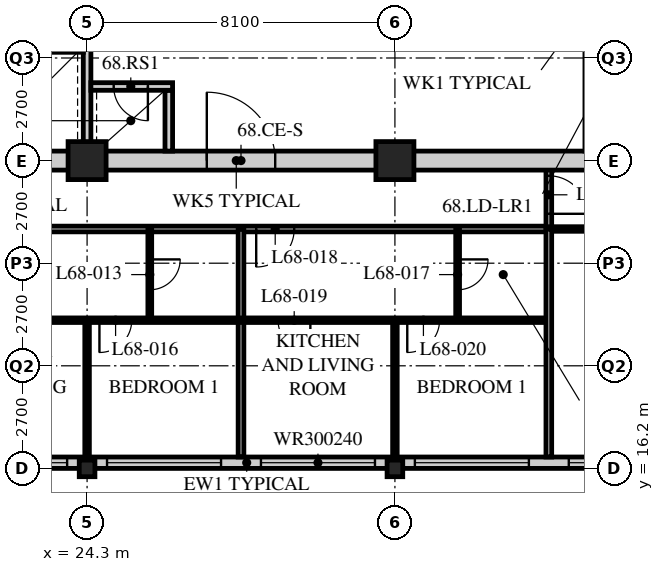
"""IFC4 building model, lengths in metres.
Left out: names, types, materials, properties, quantities, classifications, styles, units other than length and angle.
Written with IfcOpenShell. Run it as: python <this file> out.ifc"""

import sys

from ifc_helpers import new_model, si_unit, direction, frame, frame_2d, origin, origin_2d, place, context, subcontext, project, spatial, rectangle, hollow_rectangle, i_section, extrude, element, fill, save


model = new_model("IFC4")
c1 = context("Model", 3, precision=1e-05, world=origin(), true_north=direction((0.0, 1.0)))
c2 = subcontext(c1, "Body", "Model", "MODEL_VIEW")
j1 = project(units=[si_unit("LENGTHUNIT", "METRE"), si_unit("PLANEANGLEUNIT", "RADIAN")], contexts=[c1])
p1 = place(None, origin())
s1 = spatial("IfcSite", under=j1, at=p1, CompositionType="ELEMENT")
p2 = place(p1, origin())
s2 = spatial("IfcBuilding", under=s1, at=p2, CompositionType="ELEMENT")
p3 = place(p2, frame((0.0, 0.0, 265.8)))
s3 = spatial("IfcBuildingStorey", under=s2, at=p3, CompositionType="ELEMENT", Elevation=265.8)
p4 = place(p3, frame((24.3, 16.2, 0.0), z_axis=(0.0, 0.0, 1.0), x_axis=(1.0, 0.0, 0.0)))
e1 = element("IfcColumn", 1, at=p4, inside=s3, PredefinedType="COLUMN", context=c2, shape_type="SweptSolid", body=[
    extrude(i_section(OverallWidth=0.412, OverallDepth=0.437, WebThickness=0.036, FlangeThickness=0.058, FilletRadius=0.015, at=origin_2d()), origin(), (0.0, 0.0, 1.0), 3.9),
])
p5 = place(p3, frame((24.3, 24.3, 0.0), z_axis=(0.0, 0.0, 1.0), x_axis=(1.0, 0.0, 0.0)))
e2 = element("IfcColumn", 2, at=p5, inside=s3, PredefinedType="COLUMN", context=c2, shape_type="SweptSolid", body=[
    extrude(hollow_rectangle(XDim=1.0, YDim=1.0, WallThickness=0.1, at=origin_2d()), origin(), (0.0, 0.0, 1.0), 3.9),
])
p6 = place(p3, frame((32.4, 16.2, 0.0), z_axis=(0.0, 0.0, 1.0), x_axis=(1.0, 0.0, 0.0)))
e3 = element("IfcColumn", 3, at=p6, inside=s3, PredefinedType="COLUMN", context=c2, shape_type="SweptSolid", body=[
    extrude(i_section(OverallWidth=0.412, OverallDepth=0.437, WebThickness=0.036, FlangeThickness=0.058, FilletRadius=0.015, at=origin_2d()), origin(), (0.0, 0.0, 1.0), 3.9),
])
p7 = place(p3, frame((32.4, 24.3, 0.0), z_axis=(0.0, 0.0, 1.0), x_axis=(1.0, 0.0, 0.0)))
e4 = element("IfcColumn", 4, at=p7, inside=s3, PredefinedType="COLUMN", context=c2, shape_type="SweptSolid", body=[
    extrude(hollow_rectangle(XDim=1.0, YDim=1.0, WallThickness=0.1, at=origin_2d()), origin(), (0.0, 0.0, 1.0), 3.9),
])
p8 = place(p3, frame((8.4, 16.35, 0.0), z_axis=(0.0, 0.0, 1.0), x_axis=(1.0, 0.0, 0.0)))
e5 = element("IfcWall", 5, at=p8, inside=s3, PredefinedType="SOLIDWALL", context=c2, shape_type="SweptSolid", body=[
    extrude(rectangle(XDim=40.2, YDim=0.3, at=frame_2d((20.1, 0.0))), origin(), (0.0, 0.0, 1.0), 3.69),
])
p9 = place(p8, frame((0.225, 0.0, 0.6)))
e6 = element("IfcOpeningElement", 6, at=p9, cuts=e5, PredefinedType="OPENING", context=c2, shape_type="SweptSolid", body=[
    extrude(rectangle(XDim=3.0, YDim=2.4, at=frame_2d((1.5, 1.2))), frame((0.0, 0.16, 0.0), z_axis=(0.0, -1.0, 0.0), x_axis=(1.0, 0.0, 0.0)), (0.0, 0.0, 1.0), 0.32),
])
p10 = place(p8, frame((4.275, 0.0, 0.6)))
e7 = element("IfcOpeningElement", 7, at=p10, cuts=e5, PredefinedType="OPENING", context=c2, shape_type="SweptSolid", body=[
    extrude(rectangle(XDim=3.0, YDim=2.4, at=frame_2d((1.5, 1.2))), frame((0.0, 0.16, 0.0), z_axis=(0.0, -1.0, 0.0), x_axis=(1.0, 0.0, 0.0)), (0.0, 0.0, 1.0), 0.32),
])
p11 = place(p8, frame((8.325, 0.0, 0.6)))
e8 = element("IfcOpeningElement", 8, at=p11, cuts=e5, PredefinedType="OPENING", context=c2, shape_type="SweptSolid", body=[
    extrude(rectangle(XDim=3.0, YDim=2.4, at=frame_2d((1.5, 1.2))), frame((0.0, 0.16, 0.0), z_axis=(0.0, -1.0, 0.0), x_axis=(1.0, 0.0, 0.0)), (0.0, 0.0, 1.0), 0.32),
])
p12 = place(p8, frame((12.375, 0.0, 0.6)))
e9 = element("IfcOpeningElement", 9, at=p12, cuts=e5, PredefinedType="OPENING", context=c2, shape_type="SweptSolid", body=[
    extrude(rectangle(XDim=3.0, YDim=2.4, at=frame_2d((1.5, 1.2))), frame((0.0, 0.16, 0.0), z_axis=(0.0, -1.0, 0.0), x_axis=(1.0, 0.0, 0.0)), (0.0, 0.0, 1.0), 0.32),
])
p13 = place(p8, frame((16.425, 0.0, 0.6)))
e10 = element("IfcOpeningElement", 10, at=p13, cuts=e5, PredefinedType="OPENING", context=c2, shape_type="SweptSolid", body=[
    extrude(rectangle(XDim=3.0, YDim=2.4, at=frame_2d((1.5, 1.2))), frame((0.0, 0.16, 0.0), z_axis=(0.0, -1.0, 0.0), x_axis=(1.0, 0.0, 0.0)), (0.0, 0.0, 1.0), 0.32),
])
p14 = place(p8, frame((20.475, 0.0, 0.6)))
e11 = element("IfcOpeningElement", 11, at=p14, cuts=e5, PredefinedType="OPENING", context=c2, shape_type="SweptSolid", body=[
    extrude(rectangle(XDim=3.0, YDim=2.4, at=frame_2d((1.5, 1.2))), frame((0.0, 0.16, 0.0), z_axis=(0.0, -1.0, 0.0), x_axis=(1.0, 0.0, 0.0)), (0.0, 0.0, 1.0), 0.32),
])
p15 = place(p8, frame((24.525, 0.0, 0.6)))
e12 = element("IfcOpeningElement", 12, at=p15, cuts=e5, PredefinedType="OPENING", context=c2, shape_type="SweptSolid", body=[
    extrude(rectangle(XDim=3.0, YDim=2.4, at=frame_2d((1.5, 1.2))), frame((0.0, 0.16, 0.0), z_axis=(0.0, -1.0, 0.0), x_axis=(1.0, 0.0, 0.0)), (0.0, 0.0, 1.0), 0.32),
])
p16 = place(p8, frame((28.575, 0.0, 0.6)))
e13 = element("IfcOpeningElement", 13, at=p16, cuts=e5, PredefinedType="OPENING", context=c2, shape_type="SweptSolid", body=[
    extrude(rectangle(XDim=3.0, YDim=2.4, at=frame_2d((1.5, 1.2))), frame((0.0, 0.16, 0.0), z_axis=(0.0, -1.0, 0.0), x_axis=(1.0, 0.0, 0.0)), (0.0, 0.0, 1.0), 0.32),
])
p17 = place(p8, frame((32.625, 0.0, 0.6)))
e14 = element("IfcOpeningElement", 14, at=p17, cuts=e5, PredefinedType="OPENING", context=c2, shape_type="SweptSolid", body=[
    extrude(rectangle(XDim=3.0, YDim=2.4, at=frame_2d((1.5, 1.2))), frame((0.0, 0.16, 0.0), z_axis=(0.0, -1.0, 0.0), x_axis=(1.0, 0.0, 0.0)), (0.0, 0.0, 1.0), 0.32),
])
p18 = place(p8, frame((36.675, 0.0, 0.6)))
e15 = element("IfcOpeningElement", 15, at=p18, cuts=e5, PredefinedType="OPENING", context=c2, shape_type="SweptSolid", body=[
    extrude(rectangle(XDim=3.0, YDim=2.4, at=frame_2d((1.5, 1.2))), frame((0.0, 0.16, 0.0), z_axis=(0.0, -1.0, 0.0), x_axis=(1.0, 0.0, 0.0)), (0.0, 0.0, 1.0), 0.32),
])
p19 = place(p3, frame((8.1, 22.5, 0.0), z_axis=(0.0, 0.0, 1.0), x_axis=(1.0, 0.0, 0.0)))
e16 = element("IfcWall", 16, at=p19, inside=s3, PredefinedType="PARTITIONING", context=c2, shape_type="SweptSolid", body=[
    extrude(rectangle(XDim=28.35, YDim=0.15, at=frame_2d((14.175, 0.0))), origin(), (0.0, 0.0, 1.0), 3.69),
])
p20 = place(p19, frame((4.45, 0.0, 0.0)))
e17 = element("IfcOpeningElement", 17, at=p20, cuts=e16, PredefinedType="OPENING", context=c2, shape_type="SweptSolid", body=[
    extrude(rectangle(XDim=1.0, YDim=2.1, at=frame_2d((0.5, 1.05))), frame((0.0, 0.085, 0.0), z_axis=(0.0, -1.0, 0.0), x_axis=(1.0, 0.0, 0.0)), (0.0, 0.0, 1.0), 0.17),
])
p21 = place(p19, frame((12.55, 0.0, 0.0)))
e18 = element("IfcOpeningElement", 18, at=p21, cuts=e16, PredefinedType="OPENING", context=c2, shape_type="SweptSolid", body=[
    extrude(rectangle(XDim=1.0, YDim=2.1, at=frame_2d((0.5, 1.05))), frame((0.0, 0.085, 0.0), z_axis=(0.0, -1.0, 0.0), x_axis=(1.0, 0.0, 0.0)), (0.0, 0.0, 1.0), 0.17),
])
p22 = place(p19, frame((20.65, 0.0, 0.0)))
e19 = element("IfcOpeningElement", 19, at=p22, cuts=e16, PredefinedType="OPENING", context=c2, shape_type="SweptSolid", body=[
    extrude(rectangle(XDim=1.0, YDim=2.1, at=frame_2d((0.5, 1.05))), frame((0.0, 0.085, 0.0), z_axis=(0.0, -1.0, 0.0), x_axis=(1.0, 0.0, 0.0)), (0.0, 0.0, 1.0), 0.17),
])
p23 = place(p19, frame((2.625, 0.0, 0.0)))
e20 = element("IfcOpeningElement", 20, at=p23, cuts=e16, PredefinedType="OPENING", context=c2, shape_type="SweptSolid", body=[
    extrude(rectangle(XDim=1.0, YDim=2.1, at=frame_2d((0.5, 1.05))), frame((0.0, 0.085, 0.0), z_axis=(0.0, -1.0, 0.0), x_axis=(1.0, 0.0, 0.0)), (0.0, 0.0, 1.0), 0.17),
])
p24 = place(p3, frame((36.45, 22.5, 0.0), z_axis=(0.0, 0.0, 1.0), x_axis=(0.0, 1.0, 0.0)))
e21 = element("IfcWall", 21, at=p24, inside=s3, PredefinedType="PARTITIONING", context=c2, shape_type="SweptSolid", body=[
    extrude(rectangle(XDim=1.8, YDim=0.15, at=frame_2d((0.9, 0.0))), origin(), (0.0, 0.0, 1.0), 3.69),
])
p25 = place(p24, frame((0.4, 0.0, 0.0)))
e22 = element("IfcOpeningElement", 22, at=p25, cuts=e21, PredefinedType="OPENING", context=c2, shape_type="SweptSolid", body=[
    extrude(rectangle(XDim=1.0, YDim=2.1, at=frame_2d((0.5, 1.05))), frame((0.0, 0.085, 0.0), z_axis=(0.0, -1.0, 0.0), x_axis=(1.0, 0.0, 0.0)), (0.0, 0.0, 1.0), 0.17),
])
p26 = place(p3, frame((25.95, 22.5, 0.0), z_axis=(0.0, 0.0, 1.0), x_axis=(0.0, -1.0, 0.0)))
e23 = element("IfcWall", 23, at=p26, inside=s3, PredefinedType="PARTITIONING", context=c2, shape_type="SweptSolid", body=[
    extrude(rectangle(XDim=2.4, YDim=0.1, at=frame_2d((1.2, 0.0))), origin(), (0.0, 0.0, 1.0), 3.69),
])
p27 = place(p26, frame((0.8, 0.0, 0.0)))
e24 = element("IfcOpeningElement", 24, at=p27, cuts=e23, PredefinedType="OPENING", context=c2, shape_type="SweptSolid", body=[
    extrude(rectangle(XDim=0.8, YDim=2.1, at=frame_2d((0.4, 1.05))), frame((0.0, 0.06, 0.0), z_axis=(0.0, -1.0, 0.0), x_axis=(1.0, 0.0, 0.0)), (0.0, 0.0, 1.0), 0.12),
])
p28 = place(p3, frame((24.3, 20.1, 0.0), z_axis=(0.0, 0.0, 1.0), x_axis=(0.0, -1.0, 0.0)))
e25 = element("IfcWall", 25, at=p28, inside=s3, PredefinedType="PARTITIONING", context=c2, shape_type="SweptSolid", body=[
    extrude(rectangle(XDim=3.6, YDim=0.12, at=frame_2d((1.8, 0.0))), origin(), (0.0, 0.0, 1.0), 3.078),
])
p29 = place(p3, frame((28.35, 22.5, 0.0), z_axis=(0.0, 0.0, 1.0), x_axis=(0.0, -1.0, 0.0)))
e26 = element("IfcWall", 26, at=p29, inside=s3, PredefinedType="PARTITIONING", context=c2, shape_type="SweptSolid", body=[
    extrude(rectangle(XDim=6.0, YDim=0.15, at=frame_2d((3.0, 0.0))), origin(), (0.0, 0.0, 1.0), 3.69),
])
p30 = place(p3, frame((34.05, 22.5, 0.0), z_axis=(0.0, 0.0, 1.0), x_axis=(0.0, -1.0, 0.0)))
e27 = element("IfcWall", 27, at=p30, inside=s3, PredefinedType="PARTITIONING", context=c2, shape_type="SweptSolid", body=[
    extrude(rectangle(XDim=2.4, YDim=0.1, at=frame_2d((1.2, 0.0))), origin(), (0.0, 0.0, 1.0), 3.69),
])
p31 = place(p30, frame((0.8, 0.0, 0.0)))
e28 = element("IfcOpeningElement", 28, at=p31, cuts=e27, PredefinedType="OPENING", context=c2, shape_type="SweptSolid", body=[
    extrude(rectangle(XDim=0.8, YDim=2.1, at=frame_2d((0.4, 1.05))), frame((0.0, 0.06, 0.0), z_axis=(0.0, -1.0, 0.0), x_axis=(1.0, 0.0, 0.0)), (0.0, 0.0, 1.0), 0.12),
])
p32 = place(p3, frame((32.4, 20.1, 0.0), z_axis=(0.0, 0.0, 1.0), x_axis=(0.0, -1.0, 0.0)))
e29 = element("IfcWall", 29, at=p32, inside=s3, PredefinedType="PARTITIONING", context=c2, shape_type="SweptSolid", body=[
    extrude(rectangle(XDim=3.6, YDim=0.12, at=frame_2d((1.8, 0.0))), origin(), (0.0, 0.0, 1.0), 3.078),
])
p33 = place(p3, frame((8.1, 20.1, 0.0), z_axis=(0.0, 0.0, 1.0), x_axis=(1.0, 0.0, 0.0)))
e30 = element("IfcWall", 30, at=p33, inside=s3, PredefinedType="PARTITIONING", context=c2, shape_type="SweptSolid", body=[
    extrude(rectangle(XDim=28.35, YDim=0.12, at=frame_2d((14.175, 0.0))), origin(), (0.0, 0.0, 1.0), 3.69),
])
p34 = place(p33, frame((5.025, 0.0, 0.0)))
e31 = element("IfcOpeningElement", 31, at=p34, cuts=e30, PredefinedType="OPENING", context=c2, shape_type="SweptSolid", body=[
    extrude(rectangle(XDim=0.85, YDim=2.1, at=frame_2d((0.425, 1.05))), frame((0.0, 0.07, 0.0), z_axis=(0.0, -1.0, 0.0), x_axis=(1.0, 0.0, 0.0)), (0.0, 0.0, 1.0), 0.14),
])
p35 = place(p33, frame((8.425, 0.0, 0.0)))
e32 = element("IfcOpeningElement", 32, at=p35, cuts=e30, PredefinedType="OPENING", context=c2, shape_type="SweptSolid", body=[
    extrude(rectangle(XDim=0.85, YDim=2.1, at=frame_2d((0.425, 1.05))), frame((0.0, 0.07, 0.0), z_axis=(0.0, -1.0, 0.0), x_axis=(1.0, 0.0, 0.0)), (0.0, 0.0, 1.0), 0.14),
])
p36 = place(p33, frame((13.125, 0.0, 0.0)))
e33 = element("IfcOpeningElement", 33, at=p36, cuts=e30, PredefinedType="OPENING", context=c2, shape_type="SweptSolid", body=[
    extrude(rectangle(XDim=0.85, YDim=2.1, at=frame_2d((0.425, 1.05))), frame((0.0, 0.07, 0.0), z_axis=(0.0, -1.0, 0.0), x_axis=(1.0, 0.0, 0.0)), (0.0, 0.0, 1.0), 0.14),
])
p37 = place(p33, frame((16.525, 0.0, 0.0)))
e34 = element("IfcOpeningElement", 34, at=p37, cuts=e30, PredefinedType="OPENING", context=c2, shape_type="SweptSolid", body=[
    extrude(rectangle(XDim=0.85, YDim=2.1, at=frame_2d((0.425, 1.05))), frame((0.0, 0.07, 0.0), z_axis=(0.0, -1.0, 0.0), x_axis=(1.0, 0.0, 0.0)), (0.0, 0.0, 1.0), 0.14),
])
p38 = place(p33, frame((21.225, 0.0, 0.0)))
e35 = element("IfcOpeningElement", 35, at=p38, cuts=e30, PredefinedType="OPENING", context=c2, shape_type="SweptSolid", body=[
    extrude(rectangle(XDim=0.85, YDim=2.1, at=frame_2d((0.425, 1.05))), frame((0.0, 0.07, 0.0), z_axis=(0.0, -1.0, 0.0), x_axis=(1.0, 0.0, 0.0)), (0.0, 0.0, 1.0), 0.14),
])
p39 = place(p33, frame((24.625, 0.0, 0.0)))
e36 = element("IfcOpeningElement", 36, at=p39, cuts=e30, PredefinedType="OPENING", context=c2, shape_type="SweptSolid", body=[
    extrude(rectangle(XDim=0.85, YDim=2.1, at=frame_2d((0.425, 1.05))), frame((0.0, 0.07, 0.0), z_axis=(0.0, -1.0, 0.0), x_axis=(1.0, 0.0, 0.0)), (0.0, 0.0, 1.0), 0.14),
])
p40 = place(p33, frame((2.725, 0.0, 0.0)))
e37 = element("IfcOpeningElement", 37, at=p40, cuts=e30, PredefinedType="OPENING", context=c2, shape_type="SweptSolid", body=[
    extrude(rectangle(XDim=0.85, YDim=2.1, at=frame_2d((0.425, 1.05))), frame((0.0, 0.07, 0.0), z_axis=(0.0, -1.0, 0.0), x_axis=(1.0, 0.0, 0.0)), (0.0, 0.0, 1.0), 0.14),
])
p41 = place(p3, frame((36.45, 22.5, 0.0), z_axis=(0.0, 0.0, 1.0), x_axis=(1.0, 0.0, 0.0)))
e38 = element("IfcWall", 38, at=p41, inside=s3, PredefinedType="PARTITIONING", context=c2, shape_type="SweptSolid", body=[
    extrude(rectangle(XDim=6.45, YDim=0.12, at=frame_2d((3.225, 0.0))), origin(), (0.0, 0.0, 1.0), 3.69),
])
p42 = place(p41, frame((2.8, 0.0, 0.0)))
e39 = element("IfcOpeningElement", 39, at=p42, cuts=e38, PredefinedType="OPENING", context=c2, shape_type="SweptSolid", body=[
    extrude(rectangle(XDim=0.85, YDim=2.1, at=frame_2d((0.425, 1.05))), frame((0.0, 0.07, 0.0), z_axis=(0.0, -1.0, 0.0), x_axis=(1.0, 0.0, 0.0)), (0.0, 0.0, 1.0), 0.14),
])
p43 = place(p3, frame((36.45, 16.5, 0.0), z_axis=(0.0, 0.0, 1.0), x_axis=(0.0, 1.0, 0.0)))
e40 = element("IfcWall", 40, at=p43, inside=s3, PredefinedType="PARTITIONING", context=c2, shape_type="SweptSolid", body=[
    extrude(rectangle(XDim=6.0, YDim=0.15, at=frame_2d((3.0, 0.0))), origin(), (0.0, 0.0, 1.0), 3.69),
])
p44 = place(p3, frame((15.95, 24.3, 0.0), z_axis=(0.0, 0.0, 1.0), x_axis=(1.0, 0.0, 0.0)))
e41 = element("IfcWall", 41, at=p44, inside=s3, PredefinedType="SOLIDWALL", context=c2, shape_type="SweptSolid", body=[
    extrude(rectangle(XDim=24.55, YDim=0.5, at=frame_2d((12.275, 0.0))), origin(), (0.0, 0.0, 1.0), 3.04),
])
p45 = place(p44, frame((11.5, 0.0, 0.0)))
e42 = element("IfcOpeningElement", 42, at=p45, cuts=e41, PredefinedType="OPENING", context=c2, shape_type="SweptSolid", body=[
    extrude(rectangle(XDim=1.8, YDim=2.4, at=frame_2d((0.9, 1.2))), frame((0.0, 0.26, 0.0), z_axis=(0.0, -1.0, 0.0), x_axis=(1.0, 0.0, 0.0)), (0.0, 0.0, 1.0), 0.52),
])
p46 = place(p3, frame((24.3, 24.55, 0.0), z_axis=(0.0, 0.0, 1.0), x_axis=(0.0, 1.0, 0.0)))
e43 = element("IfcWall", 43, at=p46, inside=s3, PredefinedType="SOLIDWALL", context=c2, shape_type="SweptSolid", body=[
    extrude(rectangle(XDim=7.75, YDim=0.2, at=frame_2d((3.875, 0.0))), origin(), (0.0, 0.0, 1.0), 3.078),
])
p47 = place(p46, frame((4.6, 0.0, 0.0)))
e44 = element("IfcOpeningElement", 44, at=p47, cuts=e43, PredefinedType="OPENING", context=c2, shape_type="SweptSolid", body=[
    extrude(rectangle(XDim=1.2, YDim=2.1, at=frame_2d((0.6, 1.05))), frame((0.0, 0.11, 0.0), z_axis=(0.0, -1.0, 0.0), x_axis=(1.0, 0.0, 0.0)), (0.0, 0.0, 1.0), 0.22),
])
p48 = place(p3, frame((26.45, 24.55, 0.0), z_axis=(0.0, 0.0, 1.0), x_axis=(0.0, 1.0, 0.0)))
e45 = element("IfcWall", 45, at=p48, inside=s3, PredefinedType="SOLIDWALL", context=c2, shape_type="SweptSolid", body=[
    extrude(rectangle(XDim=1.6, YDim=0.2, at=frame_2d((0.8, 0.0))), origin(), (0.0, 0.0, 1.0), 3.69),
])
p49 = place(p3, frame((24.4, 26.25, 0.0), z_axis=(0.0, 0.0, 1.0), x_axis=(1.0, 0.0, 0.0)))
e46 = element("IfcWall", 46, at=p49, inside=s3, PredefinedType="SOLIDWALL", context=c2, shape_type="SweptSolid", body=[
    extrude(rectangle(XDim=2.15, YDim=0.2, at=frame_2d((1.075, 0.0))), origin(), (0.0, 0.0, 1.0), 3.69),
])
p50 = place(p49, frame((0.6, 0.0, 0.0)))
e47 = element("IfcOpeningElement", 47, at=p50, cuts=e46, PredefinedType="OPENING", context=c2, shape_type="SweptSolid", body=[
    extrude(rectangle(XDim=0.9, YDim=2.1, at=frame_2d((0.45, 1.05))), frame((0.0, 0.11, 0.0), z_axis=(0.0, -1.0, 0.0), x_axis=(1.0, 0.0, 0.0)), (0.0, 0.0, 1.0), 0.22),
])
p51 = place(p12, origin())
e48 = element("IfcWindow", 48, at=p51, inside=s3, PartitioningType="SINGLE_PANEL", PredefinedType="WINDOW", context=c2, shape_type="SweptSolid", body=[
    extrude(rectangle(XDim=3.0, YDim=2.4, at=frame_2d((1.5, 1.2))), frame((0.0, 0.03, 0.0), z_axis=(0.0, -1.0, 0.0), x_axis=(1.0, 0.0, 0.0)), (0.0, 0.0, 1.0), 0.06),
])
fill(e9, e48)
p52 = place(p13, origin())
e49 = element("IfcWindow", 49, at=p52, inside=s3, PartitioningType="SINGLE_PANEL", PredefinedType="WINDOW", context=c2, shape_type="SweptSolid", body=[
    extrude(rectangle(XDim=3.0, YDim=2.4, at=frame_2d((1.5, 1.2))), frame((0.0, 0.03, 0.0), z_axis=(0.0, -1.0, 0.0), x_axis=(1.0, 0.0, 0.0)), (0.0, 0.0, 1.0), 0.06),
])
fill(e10, e49)
p53 = place(p14, origin())
e50 = element("IfcWindow", 50, at=p53, inside=s3, PartitioningType="SINGLE_PANEL", PredefinedType="WINDOW", context=c2, shape_type="SweptSolid", body=[
    extrude(rectangle(XDim=3.0, YDim=2.4, at=frame_2d((1.5, 1.2))), frame((0.0, 0.03, 0.0), z_axis=(0.0, -1.0, 0.0), x_axis=(1.0, 0.0, 0.0)), (0.0, 0.0, 1.0), 0.06),
])
fill(e11, e50)
p54 = place(p15, origin())
e51 = element("IfcWindow", 51, at=p54, inside=s3, PartitioningType="SINGLE_PANEL", PredefinedType="WINDOW", context=c2, shape_type="SweptSolid", body=[
    extrude(rectangle(XDim=3.0, YDim=2.4, at=frame_2d((1.5, 1.2))), frame((0.0, 0.03, 0.0), z_axis=(0.0, -1.0, 0.0), x_axis=(1.0, 0.0, 0.0)), (0.0, 0.0, 1.0), 0.06),
])
fill(e12, e51)
p55 = place(p16, origin())
e52 = element("IfcWindow", 52, at=p55, inside=s3, PartitioningType="SINGLE_PANEL", PredefinedType="WINDOW", context=c2, shape_type="SweptSolid", body=[
    extrude(rectangle(XDim=3.0, YDim=2.4, at=frame_2d((1.5, 1.2))), frame((0.0, 0.03, 0.0), z_axis=(0.0, -1.0, 0.0), x_axis=(1.0, 0.0, 0.0)), (0.0, 0.0, 1.0), 0.06),
])
fill(e13, e52)
p56 = place(p27, origin())
e53 = element("IfcDoor", 53, at=p56, inside=s3, OperationType="SINGLE_SWING_LEFT", PredefinedType="DOOR", context=c2, shape_type="SweptSolid", body=[
    extrude(rectangle(XDim=0.8, YDim=2.1, at=frame_2d((0.4, 1.05))), frame((0.0, 0.025, 0.0), z_axis=(0.0, -1.0, 0.0), x_axis=(1.0, 0.0, 0.0)), (0.0, 0.0, 1.0), 0.05),
])
fill(e24, e53)
p57 = place(p37, origin())
e54 = element("IfcDoor", 54, at=p57, inside=s3, OperationType="SINGLE_SWING_RIGHT", PredefinedType="DOOR", context=c2, shape_type="SweptSolid", body=[
    extrude(rectangle(XDim=0.85, YDim=2.1, at=frame_2d((0.425, 1.05))), frame((0.0, 0.025, 0.0), z_axis=(0.0, -1.0, 0.0), x_axis=(1.0, 0.0, 0.0)), (0.0, 0.0, 1.0), 0.05),
])
fill(e34, e54)
p58 = place(p31, origin())
e55 = element("IfcDoor", 55, at=p58, inside=s3, OperationType="SINGLE_SWING_LEFT", PredefinedType="DOOR", context=c2, shape_type="SweptSolid", body=[
    extrude(rectangle(XDim=0.8, YDim=2.1, at=frame_2d((0.4, 1.05))), frame((0.0, 0.025, 0.0), z_axis=(0.0, -1.0, 0.0), x_axis=(1.0, 0.0, 0.0)), (0.0, 0.0, 1.0), 0.05),
])
fill(e28, e55)
p59 = place(p22, origin())
e56 = element("IfcDoor", 56, at=p59, inside=s3, OperationType="SINGLE_SWING_RIGHT", PredefinedType="DOOR", context=c2, shape_type="SweptSolid", body=[
    extrude(rectangle(XDim=1.0, YDim=2.1, at=frame_2d((0.5, 1.05))), frame((0.0, 0.025, 0.0), z_axis=(0.0, -1.0, 0.0), x_axis=(1.0, 0.0, 0.0)), (0.0, 0.0, 1.0), 0.05),
])
fill(e19, e56)
p60 = place(p38, origin())
e57 = element("IfcDoor", 57, at=p60, inside=s3, OperationType="SINGLE_SWING_LEFT", PredefinedType="DOOR", context=c2, shape_type="SweptSolid", body=[
    extrude(rectangle(XDim=0.85, YDim=2.1, at=frame_2d((0.425, 1.05))), frame((0.0, 0.025, 0.0), z_axis=(0.0, -1.0, 0.0), x_axis=(1.0, 0.0, 0.0)), (0.0, 0.0, 1.0), 0.05),
])
fill(e35, e57)
p61 = place(p39, origin())
e58 = element("IfcDoor", 58, at=p61, inside=s3, OperationType="SINGLE_SWING_RIGHT", PredefinedType="DOOR", context=c2, shape_type="SweptSolid", body=[
    extrude(rectangle(XDim=0.85, YDim=2.1, at=frame_2d((0.425, 1.05))), frame((0.0, 0.025, 0.0), z_axis=(0.0, -1.0, 0.0), x_axis=(1.0, 0.0, 0.0)), (0.0, 0.0, 1.0), 0.05),
])
fill(e36, e58)
p62 = place(p25, origin())
e59 = element("IfcDoor", 59, at=p62, inside=s3, OperationType="SINGLE_SWING_RIGHT", PredefinedType="DOOR", context=c2, shape_type="SweptSolid", body=[
    extrude(rectangle(XDim=1.0, YDim=2.1, at=frame_2d((0.5, 1.05))), frame((0.0, 0.025, 0.0), z_axis=(0.0, -1.0, 0.0), x_axis=(1.0, 0.0, 0.0)), (0.0, 0.0, 1.0), 0.05),
])
fill(e22, e59)
p63 = place(p50, origin())
e60 = element("IfcDoor", 60, at=p63, inside=s3, OperationType="SINGLE_SWING_LEFT", PredefinedType="DOOR", context=c2, shape_type="SweptSolid", body=[
    extrude(rectangle(XDim=0.9, YDim=2.1, at=frame_2d((0.45, 1.05))), frame((0.0, 0.025, 0.0), z_axis=(0.0, -1.0, 0.0), x_axis=(1.0, 0.0, 0.0)), (0.0, 0.0, 1.0), 0.05),
])
fill(e47, e60)
p64 = place(p45, origin())
e61 = element("IfcDoor", 61, at=p64, inside=s3, OperationType="DOUBLE_DOOR_SINGLE_SWING", PredefinedType="DOOR", context=c2, shape_type="SweptSolid", body=[
    extrude(rectangle(XDim=1.8, YDim=2.4, at=frame_2d((0.9, 1.2))), frame((0.0, 0.025, 0.0), z_axis=(0.0, -1.0, 0.0), x_axis=(1.0, 0.0, 0.0)), (0.0, 0.0, 1.0), 0.05),
])
fill(e42, e61)
save(model, sys.argv[1])
